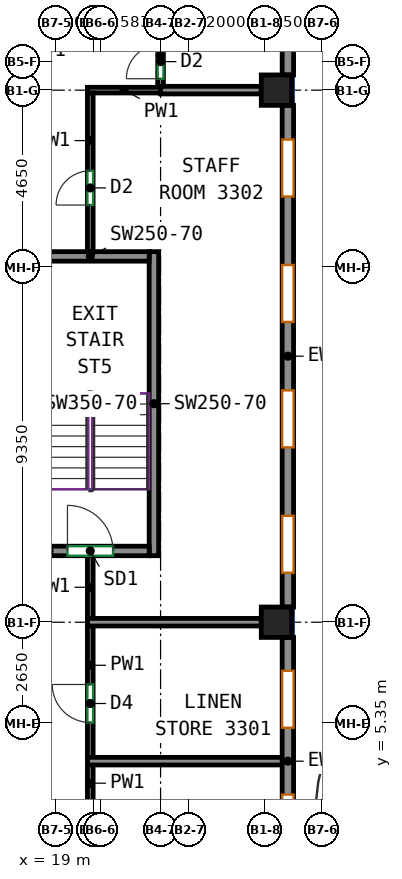
"""IFC4 building model, lengths in metres.
Left out: names, types, materials, properties, quantities, classifications, styles, units other than length and angle.
Written with IfcOpenShell. Run it as: python <this file> out.ifc"""

import sys

from ifc_helpers import new_model, si_unit, direction, frame, frame_2d, origin, origin_2d, place, context, subcontext, project, spatial, rectangle, extrude, source, transform, mapped, element, fill, save


model = new_model("IFC4")
c1 = context("Model", 3, precision=1e-05, world=origin(), true_north=direction((0.0, 1.0)))
c2 = subcontext(c1, "Body", "Model", "MODEL_VIEW")
j1 = project(units=[si_unit("LENGTHUNIT", "METRE"), si_unit("PLANEANGLEUNIT", "RADIAN")], contexts=[c1])
p1 = place(None, origin())
s1 = spatial("IfcSite", under=j1, at=p1, CompositionType="ELEMENT")
p2 = place(p1, origin())
s2 = spatial("IfcBuilding", under=s1, at=p2, CompositionType="ELEMENT")
p3 = place(p2, frame((0.0, 0.0, 147.3)))
s3 = spatial("IfcBuildingStorey", under=s2, at=p3, CompositionType="ELEMENT", Elevation=147.3)
m1 = source(origin(), c2, "Body", "SweptSolid", [
    extrude(rectangle(XDim=0.8, YDim=0.8, at=origin_2d()), origin(), (0.0, 0.0, 1.0), 3.12),
])
for number, where, z_axis, x_axis in (
    (1, (24.8, 8.0, 0.0), (0.0, 0.0, 1.0), (1.0, 0.0, 0.0)),
    (2, (24.8, 22.0, 0.0), (0.0, 0.0, 1.0), (1.0, 0.0, 0.0)),
):
    element("IfcColumn", number, at=place(p3, frame(where, z_axis=z_axis, x_axis=x_axis)), inside=s3, PredefinedType="COLUMN", context=c2, shape_type="MappedRepresentation", body=[
        mapped(m1, transform((0.0, 0.0, 0.0))),
    ])
m2 = source(origin(), c2, "Body", "SweptSolid", [
    extrude(rectangle(XDim=8.0, YDim=0.25, at=frame_2d((4.0, 0.0))), origin(), (0.0, 0.0, 1.0), 3.12),
])
p4 = place(p3, frame((21.575, 9.75, 0.0), z_axis=(0.0, 0.0, 1.0), x_axis=(0.0, 1.0, 0.0)))
e3 = element("IfcWall", 3, at=p4, inside=s3, PredefinedType="SHEAR", context=c2, shape_type="MappedRepresentation", body=[
    mapped(m2, transform((0.0, 0.0, 0.0))),
])
m3 = source(origin(), c2, "Body", "SweptSolid", [
    extrude(rectangle(XDim=3.1, YDim=0.25, at=frame_2d((1.55, 0.0))), origin(), (0.0, 0.0, 1.0), 3.12),
])
p5 = place(p3, frame((18.35, 9.875, 0.0), z_axis=(0.0, 0.0, 1.0), x_axis=(1.0, 0.0, 0.0)))
e4 = element("IfcWall", 4, at=p5, inside=s3, PredefinedType="SHEAR", context=c2, shape_type="MappedRepresentation", body=[
    mapped(m3, transform((0.0, 0.0, 0.0))),
])
p6 = place(p5, frame((0.95, 0.0, 0.0)))
e5 = element("IfcOpeningElement", 5, at=p6, cuts=e4, PredefinedType="OPENING", context=c2, shape_type="SweptSolid", body=[
    extrude(rectangle(XDim=1.2, YDim=2.1, at=frame_2d((0.6, 1.05))), frame((0.0, 0.135, 0.0), z_axis=(0.0, -1.0, 0.0), x_axis=(1.0, 0.0, 0.0)), (0.0, 0.0, 1.0), 0.27),
])
p7 = place(p3, frame((18.35, 17.625, 0.0), z_axis=(0.0, 0.0, 1.0), x_axis=(1.0, 0.0, 0.0)))
e6 = element("IfcWall", 6, at=p7, inside=s3, PredefinedType="SHEAR", context=c2, shape_type="MappedRepresentation", body=[
    mapped(m3, transform((0.0, 0.0, 0.0))),
])
m4 = source(origin(), c2, "Body", "SweptSolid", [
    extrude(rectangle(XDim=6.513, YDim=0.3, at=frame_2d((3.256, 0.0))), origin(), (0.0, 0.0, 1.0), 3.12),
])
p8 = place(p3, frame((25.1, 1.087, 0.0), z_axis=(0.0, 0.0, 1.0), x_axis=(0.0, 1.0, 0.0)))
e7 = element("IfcWall", 7, at=p8, inside=s3, PredefinedType="SOLIDWALL", context=c2, shape_type="MappedRepresentation", body=[
    mapped(m4, transform((0.0, 0.0, 0.0))),
])
p9 = place(p8, frame((0.878, 0.0, 0.85)))
e8 = element("IfcOpeningElement", 8, at=p9, cuts=e7, PredefinedType="OPENING", context=c2, shape_type="SweptSolid", body=[
    extrude(rectangle(XDim=1.5, YDim=1.95, at=frame_2d((0.75, 0.975))), frame((0.0, 0.16, 0.0), z_axis=(0.0, -1.0, 0.0), x_axis=(1.0, 0.0, 0.0)), (0.0, 0.0, 1.0), 0.32),
])
p10 = place(p8, frame((4.135, 0.0, 0.85)))
e9 = element("IfcOpeningElement", 9, at=p10, cuts=e7, PredefinedType="OPENING", context=c2, shape_type="SweptSolid", body=[
    extrude(rectangle(XDim=1.5, YDim=1.95, at=frame_2d((0.75, 0.975))), frame((0.0, 0.16, 0.0), z_axis=(0.0, -1.0, 0.0), x_axis=(1.0, 0.0, 0.0)), (0.0, 0.0, 1.0), 0.32),
])
m5 = source(origin(), c2, "Body", "SweptSolid", [
    extrude(rectangle(XDim=13.2, YDim=0.3, at=frame_2d((6.6, 0.0))), origin(), (0.0, 0.0, 1.0), 3.12),
])
p11 = place(p3, frame((25.1, 8.4, 0.0), z_axis=(0.0, 0.0, 1.0), x_axis=(0.0, 1.0, 0.0)))
e10 = element("IfcWall", 10, at=p11, inside=s3, PredefinedType="SOLIDWALL", context=c2, shape_type="MappedRepresentation", body=[
    mapped(m5, transform((0.0, 0.0, 0.0))),
])
p12 = place(p11, frame((0.9, 0.0, 0.85)))
e11 = element("IfcOpeningElement", 11, at=p12, cuts=e10, PredefinedType="OPENING", context=c2, shape_type="SweptSolid", body=[
    extrude(rectangle(XDim=1.5, YDim=1.95, at=frame_2d((0.75, 0.975))), frame((0.0, 0.16, 0.0), z_axis=(0.0, -1.0, 0.0), x_axis=(1.0, 0.0, 0.0)), (0.0, 0.0, 1.0), 0.32),
])
p13 = place(p11, frame((4.2, 0.0, 0.85)))
e12 = element("IfcOpeningElement", 12, at=p13, cuts=e10, PredefinedType="OPENING", context=c2, shape_type="SweptSolid", body=[
    extrude(rectangle(XDim=1.5, YDim=1.95, at=frame_2d((0.75, 0.975))), frame((0.0, 0.16, 0.0), z_axis=(0.0, -1.0, 0.0), x_axis=(1.0, 0.0, 0.0)), (0.0, 0.0, 1.0), 0.32),
])
p14 = place(p11, frame((7.5, 0.0, 0.85)))
e13 = element("IfcOpeningElement", 13, at=p14, cuts=e10, PredefinedType="OPENING", context=c2, shape_type="SweptSolid", body=[
    extrude(rectangle(XDim=1.5, YDim=1.95, at=frame_2d((0.75, 0.975))), frame((0.0, 0.16, 0.0), z_axis=(0.0, -1.0, 0.0), x_axis=(1.0, 0.0, 0.0)), (0.0, 0.0, 1.0), 0.32),
])
p15 = place(p11, frame((10.8, 0.0, 0.85)))
e14 = element("IfcOpeningElement", 14, at=p15, cuts=e10, PredefinedType="OPENING", context=c2, shape_type="SweptSolid", body=[
    extrude(rectangle(XDim=1.5, YDim=1.95, at=frame_2d((0.75, 0.975))), frame((0.0, 0.16, 0.0), z_axis=(0.0, -1.0, 0.0), x_axis=(1.0, 0.0, 0.0)), (0.0, 0.0, 1.0), 0.32),
])
m6 = source(origin(), c2, "Body", "SweptSolid", [
    extrude(rectangle(XDim=4.95, YDim=0.3, at=frame_2d((2.475, 0.0))), origin(), (0.0, 0.0, 1.0), 3.12),
])
p16 = place(p3, frame((25.1, 22.4, 0.0), z_axis=(0.0, 0.0, 1.0), x_axis=(0.0, 1.0, 0.0)))
e15 = element("IfcWall", 15, at=p16, inside=s3, PredefinedType="SOLIDWALL", context=c2, shape_type="MappedRepresentation", body=[
    mapped(m6, transform((0.0, 0.0, 0.0))),
])
p17 = place(p16, frame((1.75, 0.0, 0.85)))
e16 = element("IfcOpeningElement", 16, at=p17, cuts=e15, PredefinedType="OPENING", context=c2, shape_type="SweptSolid", body=[
    extrude(rectangle(XDim=1.5, YDim=1.95, at=frame_2d((0.75, 0.975))), frame((0.0, 0.16, 0.0), z_axis=(0.0, -1.0, 0.0), x_axis=(1.0, 0.0, 0.0)), (0.0, 0.0, 1.0), 0.32),
])
p18 = place(p3, frame((21.75, 22.1, 0.0), z_axis=(0.0, 0.0, 1.0), x_axis=(0.0, 1.0, 0.0)))
e17 = element("IfcWall", 17, at=p18, inside=s3, PredefinedType="PARTITIONING", context=c2, shape_type="SweptSolid", body=[
    extrude(rectangle(XDim=1.625, YDim=0.15, at=frame_2d((0.812, 0.0))), origin(), (0.0, 0.0, 1.0), 3.12),
])
p19 = place(p18, frame((0.2, 0.0, 0.0)))
e18 = element("IfcOpeningElement", 18, at=p19, cuts=e17, PredefinedType="OPENING", context=c2, shape_type="SweptSolid", body=[
    extrude(rectangle(XDim=0.9, YDim=2.1, at=frame_2d((0.45, 1.05))), frame((0.0, 0.085, 0.0), z_axis=(0.0, -1.0, 0.0), x_axis=(1.0, 0.0, 0.0)), (0.0, 0.0, 1.0), 0.17),
])
p20 = place(p3, frame((19.9, 4.434, 0.0), z_axis=(0.0, 0.0, 1.0), x_axis=(0.0, 1.0, 0.0)))
e19 = element("IfcWall", 19, at=p20, inside=s3, PredefinedType="PARTITIONING", context=c2, shape_type="SweptSolid", body=[
    extrude(rectangle(XDim=3.476, YDim=0.15, at=frame_2d((1.738, 0.0))), origin(), (0.0, 0.0, 1.0), 3.12),
])
p21 = place(p20, frame((0.927, 0.0, 0.0)))
e20 = element("IfcOpeningElement", 20, at=p21, cuts=e19, PredefinedType="OPENING", context=c2, shape_type="SweptSolid", body=[
    extrude(rectangle(XDim=1.0, YDim=2.1, at=frame_2d((0.5, 1.05))), frame((0.0, 0.085, 0.0), z_axis=(0.0, -1.0, 0.0), x_axis=(1.0, 0.0, 0.0)), (0.0, 0.0, 1.0), 0.17),
])
p22 = place(p3, frame((19.825, 22.0, 0.0), z_axis=(0.0, 0.0, 1.0), x_axis=(1.0, 0.0, 0.0)))
e21 = element("IfcWall", 21, at=p22, inside=s3, PredefinedType="PARTITIONING", context=c2, shape_type="SweptSolid", body=[
    extrude(rectangle(XDim=1.925, YDim=0.15, at=frame_2d((0.962, 0.0))), origin(), (0.0, 0.0, 1.0), 3.12),
])
p23 = place(p3, frame((19.9, 17.75, 0.0), z_axis=(0.0, 0.0, 1.0), x_axis=(0.0, 1.0, 0.0)))
e22 = element("IfcWall", 22, at=p23, inside=s3, PredefinedType="PARTITIONING", context=c2, shape_type="SweptSolid", body=[
    extrude(rectangle(XDim=4.175, YDim=0.15, at=frame_2d((2.087, 0.0))), origin(), (0.0, 0.0, 1.0), 3.12),
])
p24 = place(p23, frame((1.227, 0.0, 0.0)))
e23 = element("IfcOpeningElement", 23, at=p24, cuts=e22, PredefinedType="OPENING", context=c2, shape_type="SweptSolid", body=[
    extrude(rectangle(XDim=0.9, YDim=2.1, at=frame_2d((0.45, 1.05))), frame((0.0, 0.085, 0.0), z_axis=(0.0, -1.0, 0.0), x_axis=(1.0, 0.0, 0.0)), (0.0, 0.0, 1.0), 0.17),
])
p25 = place(p3, frame((19.9, 8.09, 0.0), z_axis=(0.0, 0.0, 1.0), x_axis=(0.0, 1.0, 0.0)))
e24 = element("IfcWall", 24, at=p25, inside=s3, PredefinedType="PARTITIONING", context=c2, shape_type="SweptSolid", body=[
    extrude(rectangle(XDim=1.66, YDim=0.15, at=frame_2d((0.83, 0.0))), origin(), (0.0, 0.0, 1.0), 3.12),
])
p26 = place(p3, frame((19.9, 3.275, 0.0), z_axis=(0.0, 0.0, 1.0), x_axis=(0.0, 1.0, 0.0)))
e25 = element("IfcWall", 25, at=p26, inside=s3, PredefinedType="PARTITIONING", context=c2, shape_type="SweptSolid", body=[
    extrude(rectangle(XDim=0.979, YDim=0.15, at=frame_2d((0.49, 0.0))), origin(), (0.0, 0.0, 1.0), 3.12),
])
p27 = place(p3, frame((21.752, 22.0, 0.0), z_axis=(0.0, 0.0, 1.0), x_axis=(1.0, 0.0, 0.0)))
e26 = element("IfcWall", 26, at=p27, inside=s3, PredefinedType="PARTITIONING", context=c2, shape_type="SweptSolid", body=[
    extrude(rectangle(XDim=2.648, YDim=0.2, at=frame_2d((1.324, 0.0))), origin(), (0.0, 0.0, 1.0), 3.12),
])
p28 = place(p3, frame((19.827, 8.0, 0.0), z_axis=(0.0, 0.0, 1.0), x_axis=(1.0, 0.0, 0.0)))
e27 = element("IfcWall", 27, at=p28, inside=s3, PredefinedType="PARTITIONING", context=c2, shape_type="SweptSolid", body=[
    extrude(rectangle(XDim=4.573, YDim=0.2, at=frame_2d((2.287, 0.0))), origin(), (0.0, 0.0, 1.0), 3.12),
])
p29 = place(p3, frame((19.827, 4.344, 0.0), z_axis=(0.0, 0.0, 1.0), x_axis=(1.0, 0.0, 0.0)))
e28 = element("IfcWall", 28, at=p29, inside=s3, PredefinedType="PARTITIONING", context=c2, shape_type="SweptSolid", body=[
    extrude(rectangle(XDim=5.173, YDim=0.2, at=frame_2d((2.586, 0.0))), origin(), (0.0, 0.0, 1.0), 3.12),
])
p30 = place(p9, origin())
e29 = element("IfcWindow", 29, at=p30, inside=s3, PartitioningType="SINGLE_PANEL", PredefinedType="WINDOW", context=c2, shape_type="SweptSolid", body=[
    extrude(rectangle(XDim=1.5, YDim=1.95, at=frame_2d((0.75, 0.975))), frame((0.0, 0.03, 0.0), z_axis=(0.0, -1.0, 0.0), x_axis=(1.0, 0.0, 0.0)), (0.0, 0.0, 1.0), 0.06),
])
fill(e8, e29)
p31 = place(p10, origin())
e30 = element("IfcWindow", 30, at=p31, inside=s3, PartitioningType="SINGLE_PANEL", PredefinedType="WINDOW", context=c2, shape_type="SweptSolid", body=[
    extrude(rectangle(XDim=1.5, YDim=1.95, at=frame_2d((0.75, 0.975))), frame((0.0, 0.03, 0.0), z_axis=(0.0, -1.0, 0.0), x_axis=(1.0, 0.0, 0.0)), (0.0, 0.0, 1.0), 0.06),
])
fill(e9, e30)
p32 = place(p12, origin())
e31 = element("IfcWindow", 31, at=p32, inside=s3, PartitioningType="SINGLE_PANEL", PredefinedType="WINDOW", context=c2, shape_type="SweptSolid", body=[
    extrude(rectangle(XDim=1.5, YDim=1.95, at=frame_2d((0.75, 0.975))), frame((0.0, 0.03, 0.0), z_axis=(0.0, -1.0, 0.0), x_axis=(1.0, 0.0, 0.0)), (0.0, 0.0, 1.0), 0.06),
])
fill(e11, e31)
p33 = place(p13, origin())
e32 = element("IfcWindow", 32, at=p33, inside=s3, PartitioningType="SINGLE_PANEL", PredefinedType="WINDOW", context=c2, shape_type="SweptSolid", body=[
    extrude(rectangle(XDim=1.5, YDim=1.95, at=frame_2d((0.75, 0.975))), frame((0.0, 0.03, 0.0), z_axis=(0.0, -1.0, 0.0), x_axis=(1.0, 0.0, 0.0)), (0.0, 0.0, 1.0), 0.06),
])
fill(e12, e32)
p34 = place(p14, origin())
e33 = element("IfcWindow", 33, at=p34, inside=s3, PartitioningType="SINGLE_PANEL", PredefinedType="WINDOW", context=c2, shape_type="SweptSolid", body=[
    extrude(rectangle(XDim=1.5, YDim=1.95, at=frame_2d((0.75, 0.975))), frame((0.0, 0.03, 0.0), z_axis=(0.0, -1.0, 0.0), x_axis=(1.0, 0.0, 0.0)), (0.0, 0.0, 1.0), 0.06),
])
fill(e13, e33)
p35 = place(p15, origin())
e34 = element("IfcWindow", 34, at=p35, inside=s3, PartitioningType="SINGLE_PANEL", PredefinedType="WINDOW", context=c2, shape_type="SweptSolid", body=[
    extrude(rectangle(XDim=1.5, YDim=1.95, at=frame_2d((0.75, 0.975))), frame((0.0, 0.03, 0.0), z_axis=(0.0, -1.0, 0.0), x_axis=(1.0, 0.0, 0.0)), (0.0, 0.0, 1.0), 0.06),
])
fill(e14, e34)
p36 = place(p6, origin())
e35 = element("IfcDoor", 35, at=p36, inside=s3, OperationType="DOUBLE_DOOR_SINGLE_SWING", PredefinedType="DOOR", context=c2, shape_type="SweptSolid", body=[
    extrude(rectangle(XDim=1.2, YDim=2.1, at=frame_2d((0.6, 1.05))), frame((0.0, 0.025, 0.0), z_axis=(0.0, -1.0, 0.0), x_axis=(1.0, 0.0, 0.0)), (0.0, 0.0, 1.0), 0.05),
])
fill(e5, e35)
p37 = place(p21, origin())
e36 = element("IfcDoor", 36, at=p37, inside=s3, OperationType="SINGLE_SWING_RIGHT", PredefinedType="DOOR", context=c2, shape_type="SweptSolid", body=[
    extrude(rectangle(XDim=1.0, YDim=2.1, at=frame_2d((0.5, 1.05))), frame((0.0, 0.025, 0.0), z_axis=(0.0, -1.0, 0.0), x_axis=(1.0, 0.0, 0.0)), (0.0, 0.0, 1.0), 0.05),
])
fill(e20, e36)
p38 = place(p24, origin())
e37 = element("IfcDoor", 37, at=p38, inside=s3, OperationType="SINGLE_SWING_LEFT", PredefinedType="DOOR", context=c2, shape_type="SweptSolid", body=[
    extrude(rectangle(XDim=0.9, YDim=2.1, at=frame_2d((0.45, 1.05))), frame((0.0, 0.025, 0.0), z_axis=(0.0, -1.0, 0.0), x_axis=(1.0, 0.0, 0.0)), (0.0, 0.0, 1.0), 0.05),
])
fill(e23, e37)
p39 = place(p19, origin())
e38 = element("IfcDoor", 38, at=p39, inside=s3, OperationType="SINGLE_SWING_LEFT", PredefinedType="DOOR", context=c2, shape_type="SweptSolid", body=[
    extrude(rectangle(XDim=0.9, YDim=2.1, at=frame_2d((0.45, 1.05))), frame((0.0, 0.025, 0.0), z_axis=(0.0, -1.0, 0.0), x_axis=(1.0, 0.0, 0.0)), (0.0, 0.0, 1.0), 0.05),
])
fill(e18, e38)
save(model, sys.argv[1])
